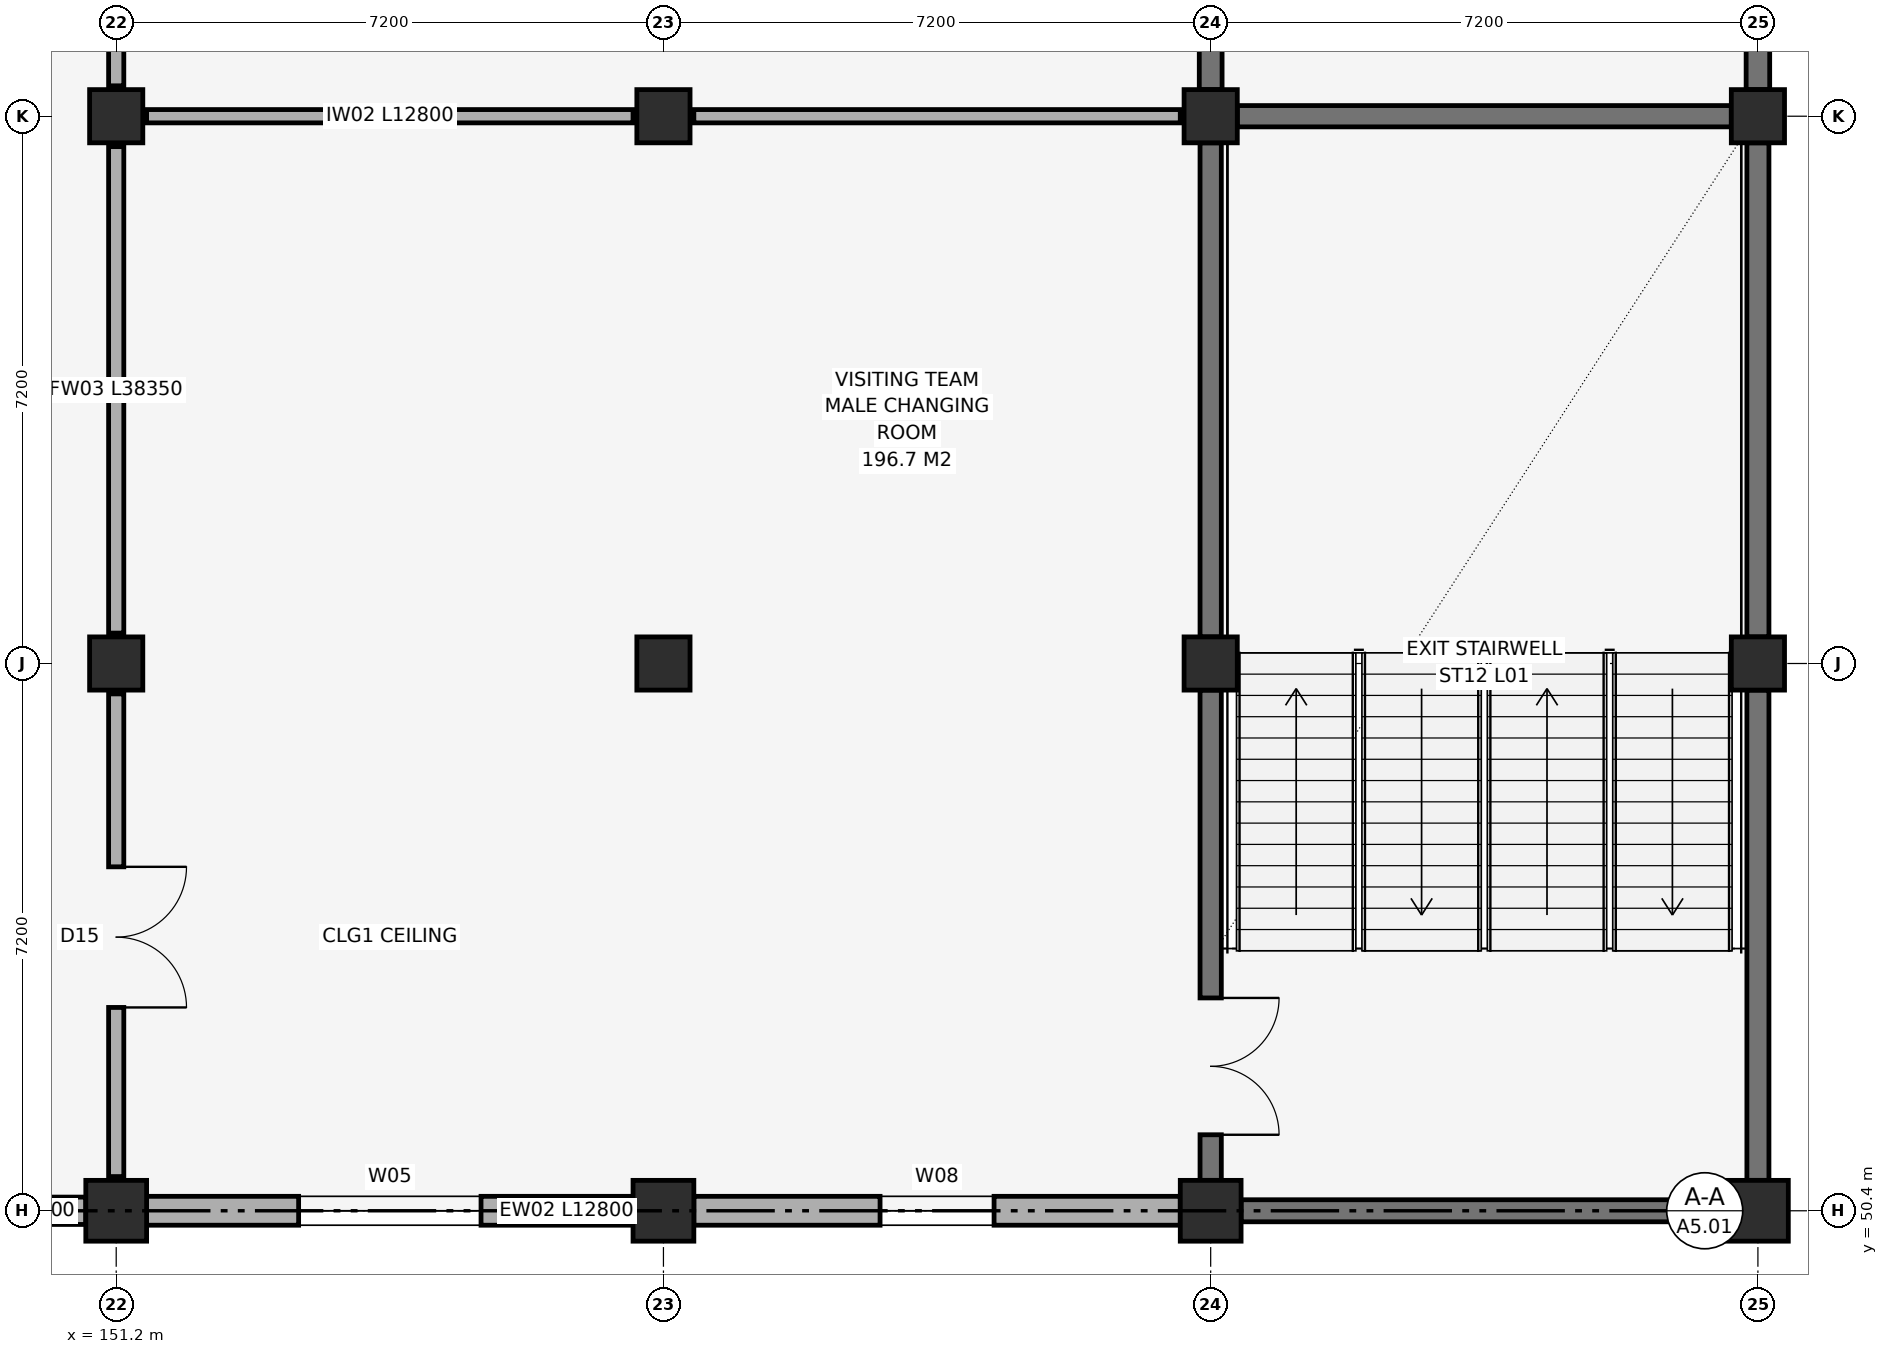
"""IFC4 building model, lengths in metres.
Left out: names, types, materials, properties, quantities, classifications, styles, units other than length and angle.
Written with IfcOpenShell. Run it as: python <this file> out.ifc"""

import sys

from ifc_helpers import new_model, si_unit, direction, frame, frame_2d, origin, origin_2d, place, context, subcontext, project, spatial, rectangle, extrude, element, fill, save


model = new_model("IFC4")
c1 = context("Model", 3, precision=1e-05, world=origin(), true_north=direction((0.0, 1.0)))
c2 = subcontext(c1, "Body", "Model", "MODEL_VIEW")
j1 = project(units=[si_unit("LENGTHUNIT", "METRE"), si_unit("PLANEANGLEUNIT", "RADIAN")], contexts=[c1])
p1 = place(None, origin())
s1 = spatial("IfcSite", under=j1, at=p1, CompositionType="ELEMENT")
p2 = place(p1, origin())
s2 = spatial("IfcBuilding", under=s1, at=p2, CompositionType="ELEMENT")
p3 = place(p2, frame((0.0, 0.0, 5.4)))
s3 = spatial("IfcBuildingStorey", under=s2, at=p3, CompositionType="ELEMENT", Elevation=5.4)
p4 = place(p3, frame((151.2, 50.4, 0.0), z_axis=(0.0, 0.0, 1.0), x_axis=(1.0, 0.0, 0.0)))
e1 = element("IfcColumn", 1, at=p4, inside=s3, PredefinedType="COLUMN", context=c2, shape_type="SweptSolid", body=[
    extrude(rectangle(XDim=0.8, YDim=0.8, at=origin_2d()), origin(), (0.0, 0.0, 1.0), 4.8),
])
for number, where, z_axis, x_axis in (
    (2, (151.2, 57.6, 0.0), (0.0, 0.0, 1.0), (1.0, 0.0, 0.0)),
    (3, (151.2, 64.8, 0.0), (0.0, 0.0, 1.0), (1.0, 0.0, 0.0)),
):
    element("IfcColumn", number, at=place(p3, frame(where, z_axis=z_axis, x_axis=x_axis)), inside=s3, PredefinedType="COLUMN", context=c2, shape_type="SweptSolid", body=[
        extrude(rectangle(XDim=0.7, YDim=0.7, at=origin_2d()), origin(), (0.0, 0.0, 1.0), 4.8),
    ])
p5 = place(p3, frame((158.4, 50.4, 0.0), z_axis=(0.0, 0.0, 1.0), x_axis=(1.0, 0.0, 0.0)))
e4 = element("IfcColumn", 4, at=p5, inside=s3, PredefinedType="COLUMN", context=c2, shape_type="SweptSolid", body=[
    extrude(rectangle(XDim=0.8, YDim=0.8, at=origin_2d()), origin(), (0.0, 0.0, 1.0), 4.8),
])
for number, where, z_axis, x_axis in (
    (5, (158.4, 57.6, 0.0), (0.0, 0.0, 1.0), (1.0, 0.0, 0.0)),
    (6, (158.4, 64.8, 0.0), (0.0, 0.0, 1.0), (1.0, 0.0, 0.0)),
):
    element("IfcColumn", number, at=place(p3, frame(where, z_axis=z_axis, x_axis=x_axis)), inside=s3, PredefinedType="COLUMN", context=c2, shape_type="SweptSolid", body=[
        extrude(rectangle(XDim=0.7, YDim=0.7, at=origin_2d()), origin(), (0.0, 0.0, 1.0), 4.8),
    ])
p6 = place(p3, frame((165.6, 50.4, 0.0), z_axis=(0.0, 0.0, 1.0), x_axis=(1.0, 0.0, 0.0)))
e7 = element("IfcColumn", 7, at=p6, inside=s3, PredefinedType="COLUMN", context=c2, shape_type="SweptSolid", body=[
    extrude(rectangle(XDim=0.8, YDim=0.8, at=origin_2d()), origin(), (0.0, 0.0, 1.0), 4.8),
])
for number, where, z_axis, x_axis in (
    (8, (165.6, 57.6, 0.0), (0.0, 0.0, 1.0), (1.0, 0.0, 0.0)),
    (9, (165.6, 64.8, 0.0), (0.0, 0.0, 1.0), (1.0, 0.0, 0.0)),
):
    element("IfcColumn", number, at=place(p3, frame(where, z_axis=z_axis, x_axis=x_axis)), inside=s3, PredefinedType="COLUMN", context=c2, shape_type="SweptSolid", body=[
        extrude(rectangle(XDim=0.7, YDim=0.7, at=origin_2d()), origin(), (0.0, 0.0, 1.0), 4.8),
    ])
p7 = place(p3, frame((172.8, 50.4, 0.0), z_axis=(0.0, 0.0, 1.0), x_axis=(1.0, 0.0, 0.0)))
e10 = element("IfcColumn", 10, at=p7, inside=s3, PredefinedType="COLUMN", context=c2, shape_type="SweptSolid", body=[
    extrude(rectangle(XDim=0.8, YDim=0.8, at=origin_2d()), origin(), (0.0, 0.0, 1.0), 4.8),
])
for number, where, z_axis, x_axis in (
    (11, (172.8, 57.6, 0.0), (0.0, 0.0, 1.0), (1.0, 0.0, 0.0)),
    (12, (172.8, 64.8, 0.0), (0.0, 0.0, 1.0), (1.0, 0.0, 0.0)),
):
    element("IfcColumn", number, at=place(p3, frame(where, z_axis=z_axis, x_axis=x_axis)), inside=s3, PredefinedType="COLUMN", context=c2, shape_type="SweptSolid", body=[
        extrude(rectangle(XDim=0.7, YDim=0.7, at=origin_2d()), origin(), (0.0, 0.0, 1.0), 4.8),
    ])
p8 = place(p3, frame((144.4, 50.4, 0.0), z_axis=(0.0, 0.0, 1.0), x_axis=(1.0, 0.0, 0.0)))
e13 = element("IfcWall", 13, at=p8, inside=s3, PredefinedType="SOLIDWALL", context=c2, shape_type="SweptSolid", body=[
    extrude(rectangle(XDim=6.4, YDim=0.36, at=frame_2d((3.2, 0.0))), origin(), (0.0, 0.0, 1.0), 4.19),
])
p9 = place(p8, frame((2.15, 0.0, 0.95)))
e14 = element("IfcOpeningElement", 14, at=p9, cuts=e13, PredefinedType="OPENING", context=c2, shape_type="SweptSolid", body=[
    extrude(rectangle(XDim=2.1, YDim=2.65, at=frame_2d((1.05, 1.325))), frame((0.0, 0.195, 0.0), z_axis=(0.0, -1.0, 0.0), x_axis=(1.0, 0.0, 0.0)), (0.0, 0.0, 1.0), 0.39),
])
p10 = place(p3, frame((151.6, 50.4, 0.0), z_axis=(0.0, 0.0, 1.0), x_axis=(1.0, 0.0, 0.0)))
e15 = element("IfcWall", 15, at=p10, inside=s3, PredefinedType="SOLIDWALL", context=c2, shape_type="SweptSolid", body=[
    extrude(rectangle(XDim=6.4, YDim=0.38, at=frame_2d((3.2, 0.0))), origin(), (0.0, 0.0, 1.0), 4.19),
])
p11 = place(p10, frame((2.0, 0.0, 0.95)))
e16 = element("IfcOpeningElement", 16, at=p11, cuts=e15, PredefinedType="OPENING", context=c2, shape_type="SweptSolid", body=[
    extrude(rectangle(XDim=2.4, YDim=2.0, at=frame_2d((1.2, 1.0))), frame((0.0, 0.205, 0.0), z_axis=(0.0, -1.0, 0.0), x_axis=(1.0, 0.0, 0.0)), (0.0, 0.0, 1.0), 0.41),
])
p12 = place(p3, frame((158.8, 50.4, 0.0), z_axis=(0.0, 0.0, 1.0), x_axis=(1.0, 0.0, 0.0)))
e17 = element("IfcWall", 17, at=p12, inside=s3, PredefinedType="SOLIDWALL", context=c2, shape_type="SweptSolid", body=[
    extrude(rectangle(XDim=6.4, YDim=0.38, at=frame_2d((3.2, 0.0))), origin(), (0.0, 0.0, 1.0), 4.19),
])
p13 = place(p12, frame((2.45, 0.0, 0.95)))
e18 = element("IfcOpeningElement", 18, at=p13, cuts=e17, PredefinedType="OPENING", context=c2, shape_type="SweptSolid", body=[
    extrude(rectangle(XDim=1.5, YDim=2.0, at=frame_2d((0.75, 1.0))), frame((0.0, 0.205, 0.0), z_axis=(0.0, -1.0, 0.0), x_axis=(1.0, 0.0, 0.0)), (0.0, 0.0, 1.0), 0.41),
])
p14 = place(p3, frame((166.0, 50.4, 0.0), z_axis=(0.0, 0.0, 1.0), x_axis=(1.0, 0.0, 0.0)))
e19 = element("IfcWall", 19, at=p14, inside=s3, PredefinedType="SHEAR", context=c2, shape_type="SweptSolid", body=[
    extrude(rectangle(XDim=6.4, YDim=0.29, at=frame_2d((3.2, 0.0))), origin(), (0.0, 0.0, 1.0), 4.54),
])
p15 = place(p3, frame((165.95, 64.8, 0.0), z_axis=(0.0, 0.0, 1.0), x_axis=(1.0, 0.0, 0.0)))
e20 = element("IfcWall", 20, at=p15, inside=s3, PredefinedType="SHEAR", context=c2, shape_type="SweptSolid", body=[
    extrude(rectangle(XDim=6.5, YDim=0.28, at=frame_2d((3.25, 0.0))), origin(), (0.0, 0.0, 1.0), 4.54),
])
p16 = place(p3, frame((165.6, 50.8, 0.0), z_axis=(0.0, 0.0, 1.0), x_axis=(0.0, 1.0, 0.0)))
e21 = element("IfcWall", 21, at=p16, inside=s3, PredefinedType="SHEAR", context=c2, shape_type="SweptSolid", body=[
    extrude(rectangle(XDim=6.45, YDim=0.28, at=frame_2d((3.225, 0.0))), origin(), (0.0, 0.0, 1.0), 4.54),
])
p17 = place(p16, frame((0.6, 0.0, 0.0)))
e22 = element("IfcOpeningElement", 22, at=p17, cuts=e21, PredefinedType="OPENING", context=c2, shape_type="SweptSolid", body=[
    extrude(rectangle(XDim=1.8, YDim=2.2, at=frame_2d((0.9, 1.1))), frame((0.0, 0.155, 0.0), z_axis=(0.0, -1.0, 0.0), x_axis=(1.0, 0.0, 0.0)), (0.0, 0.0, 1.0), 0.31),
])
p18 = place(p3, frame((165.6, 57.95, 0.0), z_axis=(0.0, 0.0, 1.0), x_axis=(0.0, 1.0, 0.0)))
e23 = element("IfcWall", 23, at=p18, inside=s3, PredefinedType="SHEAR", context=c2, shape_type="SweptSolid", body=[
    extrude(rectangle(XDim=6.5, YDim=0.28, at=frame_2d((3.25, 0.0))), origin(), (0.0, 0.0, 1.0), 4.54),
])
p19 = place(p3, frame((172.8, 50.8, 0.0), z_axis=(0.0, 0.0, 1.0), x_axis=(0.0, 1.0, 0.0)))
e24 = element("IfcWall", 24, at=p19, inside=s3, PredefinedType="SHEAR", context=c2, shape_type="SweptSolid", body=[
    extrude(rectangle(XDim=6.45, YDim=0.29, at=frame_2d((3.225, 0.0))), origin(), (0.0, 0.0, 1.0), 4.54),
])
p20 = place(p3, frame((172.8, 57.95, 0.0), z_axis=(0.0, 0.0, 1.0), x_axis=(0.0, 1.0, 0.0)))
e25 = element("IfcWall", 25, at=p20, inside=s3, PredefinedType="SHEAR", context=c2, shape_type="SweptSolid", body=[
    extrude(rectangle(XDim=6.5, YDim=0.29, at=frame_2d((3.25, 0.0))), origin(), (0.0, 0.0, 1.0), 4.54),
])
p21 = place(p3, frame((165.6, 65.15, 0.0), z_axis=(0.0, 0.0, 1.0), x_axis=(0.0, 1.0, 0.0)))
e26 = element("IfcWall", 26, at=p21, inside=s3, PredefinedType="SHEAR", context=c2, shape_type="SweptSolid", body=[
    extrude(rectangle(XDim=6.5, YDim=0.3, at=frame_2d((3.25, 0.0))), origin(), (0.0, 0.0, 1.0), 4.54),
])
p22 = place(p21, frame((0.65, 0.0, 0.0)))
e27 = element("IfcOpeningElement", 27, at=p22, cuts=e26, PredefinedType="OPENING", context=c2, shape_type="SweptSolid", body=[
    extrude(rectangle(XDim=1.8, YDim=2.2, at=frame_2d((0.9, 1.1))), frame((0.0, 0.165, 0.0), z_axis=(0.0, -1.0, 0.0), x_axis=(1.0, 0.0, 0.0)), (0.0, 0.0, 1.0), 0.33),
])
p23 = place(p3, frame((172.8, 65.15, 0.0), z_axis=(0.0, 0.0, 1.0), x_axis=(0.0, 1.0, 0.0)))
e28 = element("IfcWall", 28, at=p23, inside=s3, PredefinedType="SHEAR", context=c2, shape_type="SweptSolid", body=[
    extrude(rectangle(XDim=6.5, YDim=0.31, at=frame_2d((3.25, 0.0))), origin(), (0.0, 0.0, 1.0), 4.54),
])
for number, where, z_axis, x_axis in (
    (29, (151.6, 64.8, 0.0), (0.0, 0.0, 1.0), (1.0, 0.0, 0.0)),
    (30, (158.8, 64.8, 0.0), (0.0, 0.0, 1.0), (1.0, 0.0, 0.0)),
):
    element("IfcWall", number, at=place(p3, frame(where, z_axis=z_axis, x_axis=x_axis)), inside=s3, PredefinedType="PARTITIONING", context=c2, shape_type="SweptSolid", body=[
        extrude(rectangle(XDim=6.4, YDim=0.175, at=frame_2d((3.2, 0.0))), origin(), (0.0, 0.0, 1.0), 3.952),
    ])
p24 = place(p3, frame((151.2, 50.85, 0.0), z_axis=(0.0, 0.0, 1.0), x_axis=(0.0, 1.0, 0.0)))
e31 = element("IfcWall", 31, at=p24, inside=s3, PredefinedType="SOLIDWALL", context=c2, shape_type="SweptSolid", body=[
    extrude(rectangle(XDim=6.35, YDim=0.2, at=frame_2d((3.175, 0.0))), origin(), (0.0, 0.0, 1.0), 4.052),
])
p25 = place(p24, frame((2.225, 0.0, 0.0)))
e32 = element("IfcOpeningElement", 32, at=p25, cuts=e31, PredefinedType="OPENING", context=c2, shape_type="SweptSolid", body=[
    extrude(rectangle(XDim=1.85, YDim=2.25, at=frame_2d((0.925, 1.125))), frame((0.0, 0.115, 0.0), z_axis=(0.0, -1.0, 0.0), x_axis=(1.0, 0.0, 0.0)), (0.0, 0.0, 1.0), 0.23),
])
p26 = place(p3, frame((151.2, 58.0, 0.0), z_axis=(0.0, 0.0, 1.0), x_axis=(0.0, 1.0, 0.0)))
e33 = element("IfcWall", 33, at=p26, inside=s3, PredefinedType="SOLIDWALL", context=c2, shape_type="SweptSolid", body=[
    extrude(rectangle(XDim=6.4, YDim=0.2, at=frame_2d((3.2, 0.0))), origin(), (0.0, 0.0, 1.0), 4.052),
])
p27 = place(p3, frame((151.2, 65.2, 0.0), z_axis=(0.0, 0.0, 1.0), x_axis=(0.0, 1.0, 0.0)))
e34 = element("IfcWall", 34, at=p27, inside=s3, PredefinedType="SOLIDWALL", context=c2, shape_type="SweptSolid", body=[
    extrude(rectangle(XDim=6.4, YDim=0.2, at=frame_2d((3.2, 0.0))), origin(), (0.0, 0.0, 1.0), 4.052),
])
p28 = place(p27, frame((2.225, 0.0, 0.0)))
e35 = element("IfcOpeningElement", 35, at=p28, cuts=e34, PredefinedType="OPENING", context=c2, shape_type="SweptSolid", body=[
    extrude(rectangle(XDim=1.95, YDim=2.25, at=frame_2d((0.975, 1.125))), frame((0.0, 0.115, 0.0), z_axis=(0.0, -1.0, 0.0), x_axis=(1.0, 0.0, 0.0)), (0.0, 0.0, 1.0), 0.23),
])
p29 = place(p11, origin())
e36 = element("IfcWindow", 36, at=p29, inside=s3, PartitioningType="SINGLE_PANEL", PredefinedType="WINDOW", context=c2, shape_type="SweptSolid", body=[
    extrude(rectangle(XDim=2.4, YDim=2.0, at=frame_2d((1.2, 1.0))), frame((0.0, 0.03, 0.0), z_axis=(0.0, -1.0, 0.0), x_axis=(1.0, 0.0, 0.0)), (0.0, 0.0, 1.0), 0.06),
])
fill(e16, e36)
p30 = place(p13, origin())
e37 = element("IfcWindow", 37, at=p30, inside=s3, PartitioningType="SINGLE_PANEL", PredefinedType="WINDOW", context=c2, shape_type="SweptSolid", body=[
    extrude(rectangle(XDim=1.5, YDim=2.0, at=frame_2d((0.75, 1.0))), frame((0.0, 0.03, 0.0), z_axis=(0.0, -1.0, 0.0), x_axis=(1.0, 0.0, 0.0)), (0.0, 0.0, 1.0), 0.06),
])
fill(e18, e37)
p31 = place(p17, frame((1.8, 0.0, 0.0), z_axis=(0.0, 0.0, 1.0), x_axis=(-1.0, 0.0, 0.0)))
e38 = element("IfcDoor", 38, at=p31, inside=s3, OperationType="DOUBLE_SWING_LEFT", PredefinedType="DOOR", context=c2, shape_type="SweptSolid", body=[
    extrude(rectangle(XDim=1.8, YDim=2.2, at=frame_2d((0.9, 1.1))), frame((0.0, 0.025, 0.0), z_axis=(0.0, -1.0, 0.0), x_axis=(1.0, 0.0, 0.0)), (0.0, 0.0, 1.0), 0.05),
])
fill(e22, e38)
p32 = place(p25, frame((1.85, 0.0, 0.0), z_axis=(0.0, 0.0, 1.0), x_axis=(-1.0, 0.0, 0.0)))
e39 = element("IfcDoor", 39, at=p32, inside=s3, OperationType="DOUBLE_SWING_LEFT", PredefinedType="DOOR", context=c2, shape_type="SweptSolid", body=[
    extrude(rectangle(XDim=1.85, YDim=2.25, at=frame_2d((0.925, 1.125))), frame((0.0, 0.025, 0.0), z_axis=(0.0, -1.0, 0.0), x_axis=(1.0, 0.0, 0.0)), (0.0, 0.0, 1.0), 0.05),
])
fill(e32, e39)
save(model, sys.argv[1])
